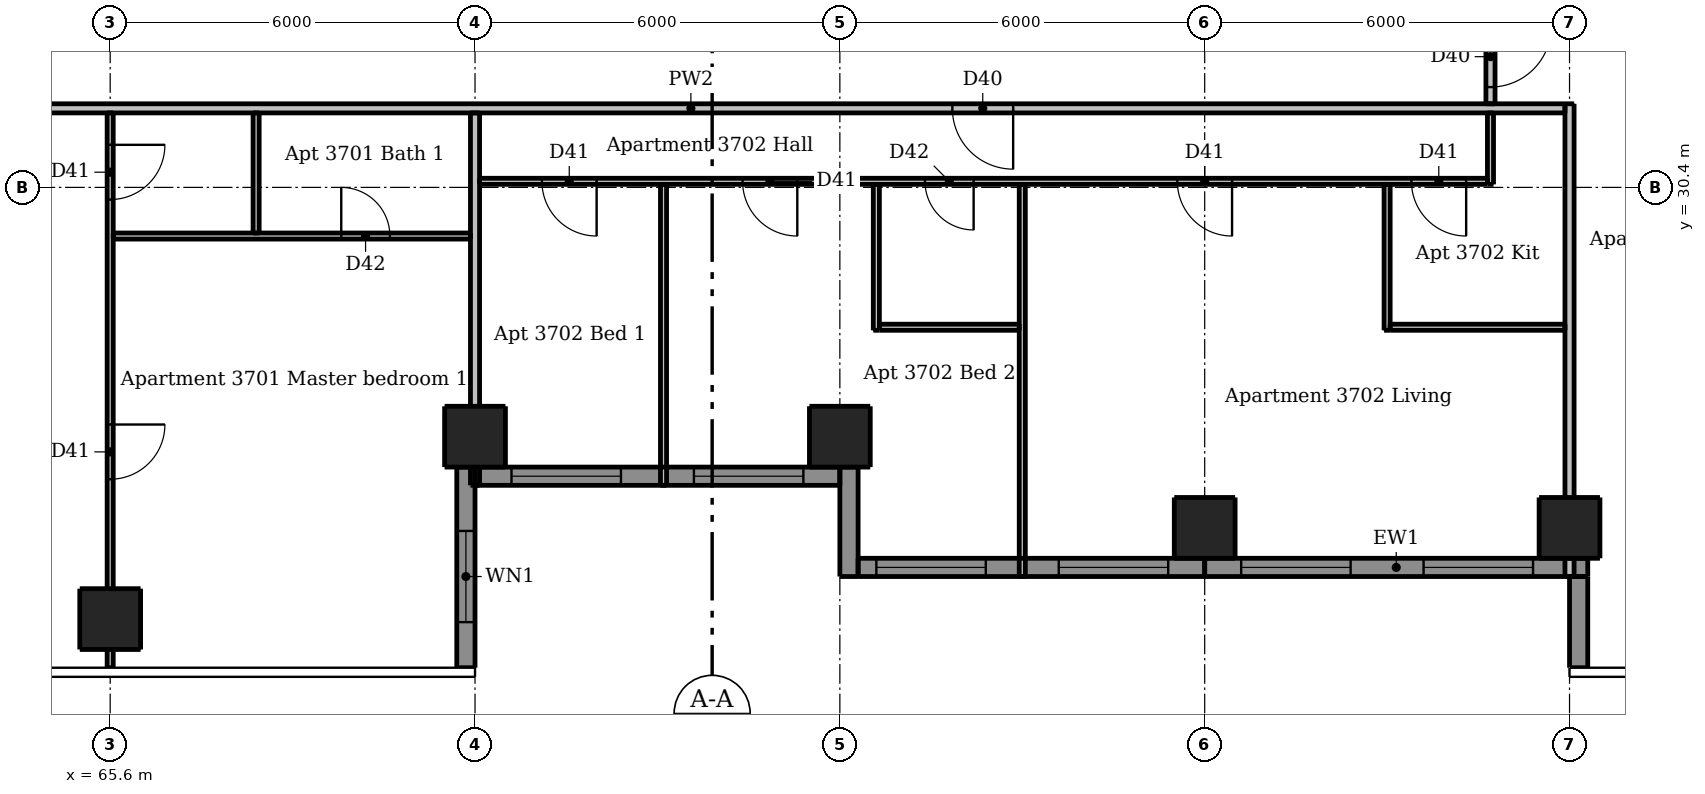
"""IFC4 building model, lengths in metres.
Left out: names, types, materials, properties, quantities, classifications, styles, units other than length and angle.
Written with IfcOpenShell. Run it as: python <this file> out.ifc"""

import sys

from ifc_helpers import new_model, si_unit, direction, frame, frame_2d, origin, origin_2d, place, context, subcontext, project, spatial, rectangle, extrude, element, fill, save


model = new_model("IFC4")
c1 = context("Model", 3, precision=1e-05, world=origin(), true_north=direction((0.0, 1.0)))
c2 = subcontext(c1, "Body", "Model", "MODEL_VIEW")
j1 = project(units=[si_unit("LENGTHUNIT", "METRE"), si_unit("PLANEANGLEUNIT", "RADIAN")], contexts=[c1])
p1 = place(None, origin())
s1 = spatial("IfcSite", under=j1, at=p1, CompositionType="ELEMENT")
p2 = place(p1, origin())
s2 = spatial("IfcBuilding", under=s1, at=p2, CompositionType="ELEMENT")
p3 = place(p2, frame((0.0, 0.0, 140.5)))
s3 = spatial("IfcBuildingStorey", under=s2, at=p3, CompositionType="ELEMENT", Elevation=140.5)
for number, where, z_axis, x_axis in (
    (1, (65.6, 23.3, 0.0), (0.0, 0.0, 1.0), (1.0, 0.0, 0.0)),
    (2, (71.6, 26.3, 0.0), (0.0, 0.0, 1.0), (1.0, 0.0, 0.0)),
    (3, (77.6, 26.3, 0.0), (0.0, 0.0, 1.0), (1.0, 0.0, 0.0)),
    (4, (83.6, 24.8, 0.0), (0.0, 0.0, 1.0), (1.0, 0.0, 0.0)),
    (5, (89.6, 24.8, 0.0), (0.0, 0.0, 1.0), (1.0, 0.0, 0.0)),
):
    element("IfcColumn", number, at=place(p3, frame(where, z_axis=z_axis, x_axis=x_axis)), inside=s3, PredefinedType="COLUMN", context=c2, shape_type="SweptSolid", body=[
        extrude(rectangle(XDim=1.0, YDim=1.0, at=origin_2d()), origin(), (0.0, 0.0, 1.0), 3.05),
    ])
p4 = place(p3, frame((71.45, 22.5, 0.0), z_axis=(0.0, 0.0, 1.0), x_axis=(0.0, 1.0, 0.0)))
e6 = element("IfcWall", 6, at=p4, inside=s3, PredefinedType="SOLIDWALL", context=c2, shape_type="SweptSolid", body=[
    extrude(rectangle(XDim=3.3, YDim=0.3, at=frame_2d((1.65, 0.0))), origin(), (0.0, 0.0, 1.0), 3.05),
])
p5 = place(p4, frame((0.75, 0.0, 0.9)))
e7 = element("IfcOpeningElement", 7, at=p5, cuts=e6, PredefinedType="OPENING", context=c2, shape_type="SweptSolid", body=[
    extrude(rectangle(XDim=1.5, YDim=1.5, at=frame_2d((0.75, 0.75))), frame((0.0, 0.16, 0.0), z_axis=(0.0, -1.0, 0.0), x_axis=(1.0, 0.0, 0.0)), (0.0, 0.0, 1.0), 0.32),
])
p6 = place(p3, frame((77.75, 25.8, 0.0), z_axis=(0.0, 0.0, 1.0), x_axis=(0.0, -1.0, 0.0)))
e8 = element("IfcWall", 8, at=p6, inside=s3, PredefinedType="SOLIDWALL", context=c2, shape_type="SweptSolid", body=[
    extrude(rectangle(XDim=1.8, YDim=0.3, at=frame_2d((0.9, 0.0))), origin(), (0.0, 0.0, 1.0), 3.05),
])
p7 = place(p3, frame((89.75, 24.0, 0.0), z_axis=(0.0, 0.0, 1.0), x_axis=(0.0, -1.0, 0.0)))
e9 = element("IfcWall", 9, at=p7, inside=s3, PredefinedType="SOLIDWALL", context=c2, shape_type="SweptSolid", body=[
    extrude(rectangle(XDim=1.5, YDim=0.3, at=frame_2d((0.75, 0.0))), origin(), (0.0, 0.0, 1.0), 3.05),
])
p8 = place(p3, frame((71.6, 25.65, 0.0), z_axis=(0.0, 0.0, 1.0), x_axis=(1.0, 0.0, 0.0)))
e10 = element("IfcWall", 10, at=p8, inside=s3, PredefinedType="SOLIDWALL", context=c2, shape_type="SweptSolid", body=[
    extrude(rectangle(XDim=6.0, YDim=0.3, at=frame_2d((3.0, 0.0))), origin(), (0.0, 0.0, 1.0), 3.05),
])
p9 = place(p8, frame((0.6, 0.0, 0.15)))
e11 = element("IfcOpeningElement", 11, at=p9, cuts=e10, PredefinedType="OPENING", context=c2, shape_type="SweptSolid", body=[
    extrude(rectangle(XDim=1.8, YDim=2.1, at=frame_2d((0.9, 1.05))), frame((0.0, 0.16, 0.0), z_axis=(0.0, -1.0, 0.0), x_axis=(1.0, 0.0, 0.0)), (0.0, 0.0, 1.0), 0.32),
])
p10 = place(p8, frame((3.6, 0.0, 0.15)))
e12 = element("IfcOpeningElement", 12, at=p10, cuts=e10, PredefinedType="OPENING", context=c2, shape_type="SweptSolid", body=[
    extrude(rectangle(XDim=1.8, YDim=2.1, at=frame_2d((0.9, 1.05))), frame((0.0, 0.16, 0.0), z_axis=(0.0, -1.0, 0.0), x_axis=(1.0, 0.0, 0.0)), (0.0, 0.0, 1.0), 0.32),
])
p11 = place(p3, frame((77.9, 24.15, 0.0), z_axis=(0.0, 0.0, 1.0), x_axis=(1.0, 0.0, 0.0)))
e13 = element("IfcWall", 13, at=p11, inside=s3, PredefinedType="SOLIDWALL", context=c2, shape_type="SweptSolid", body=[
    extrude(rectangle(XDim=5.7, YDim=0.3, at=frame_2d((2.85, 0.0))), origin(), (0.0, 0.0, 1.0), 3.05),
])
p12 = place(p11, frame((0.3, 0.0, 0.15)))
e14 = element("IfcOpeningElement", 14, at=p12, cuts=e13, PredefinedType="OPENING", context=c2, shape_type="SweptSolid", body=[
    extrude(rectangle(XDim=1.8, YDim=2.1, at=frame_2d((0.9, 1.05))), frame((0.0, 0.16, 0.0), z_axis=(0.0, -1.0, 0.0), x_axis=(1.0, 0.0, 0.0)), (0.0, 0.0, 1.0), 0.32),
])
p13 = place(p11, frame((3.3, 0.0, 0.15)))
e15 = element("IfcOpeningElement", 15, at=p13, cuts=e13, PredefinedType="OPENING", context=c2, shape_type="SweptSolid", body=[
    extrude(rectangle(XDim=1.8, YDim=2.1, at=frame_2d((0.9, 1.05))), frame((0.0, 0.16, 0.0), z_axis=(0.0, -1.0, 0.0), x_axis=(1.0, 0.0, 0.0)), (0.0, 0.0, 1.0), 0.32),
])
p14 = place(p3, frame((83.6, 24.15, 0.0), z_axis=(0.0, 0.0, 1.0), x_axis=(1.0, 0.0, 0.0)))
e16 = element("IfcWall", 16, at=p14, inside=s3, PredefinedType="SOLIDWALL", context=c2, shape_type="SweptSolid", body=[
    extrude(rectangle(XDim=6.3, YDim=0.3, at=frame_2d((3.15, 0.0))), origin(), (0.0, 0.0, 1.0), 3.05),
])
p15 = place(p14, frame((0.6, 0.0, 0.15)))
e17 = element("IfcOpeningElement", 17, at=p15, cuts=e16, PredefinedType="OPENING", context=c2, shape_type="SweptSolid", body=[
    extrude(rectangle(XDim=1.8, YDim=2.1, at=frame_2d((0.9, 1.05))), frame((0.0, 0.16, 0.0), z_axis=(0.0, -1.0, 0.0), x_axis=(1.0, 0.0, 0.0)), (0.0, 0.0, 1.0), 0.32),
])
p16 = place(p14, frame((3.6, 0.0, 0.15)))
e18 = element("IfcOpeningElement", 18, at=p16, cuts=e16, PredefinedType="OPENING", context=c2, shape_type="SweptSolid", body=[
    extrude(rectangle(XDim=1.8, YDim=2.1, at=frame_2d((0.9, 1.05))), frame((0.0, 0.16, 0.0), z_axis=(0.0, -1.0, 0.0), x_axis=(1.0, 0.0, 0.0)), (0.0, 0.0, 1.0), 0.32),
])
p17 = place(p3, frame((65.6, 31.625, 0.0), z_axis=(0.0, 0.0, 1.0), x_axis=(0.0, -1.0, 0.0)))
e19 = element("IfcWall", 19, at=p17, inside=s3, PredefinedType="PARTITIONING", context=c2, shape_type="SweptSolid", body=[
    extrude(rectangle(XDim=9.125, YDim=0.1, at=frame_2d((4.562, 0.0))), origin(), (0.0, 0.0, 1.0), 2.516),
])
p18 = place(p17, frame((0.525, 0.0, 0.0)))
e20 = element("IfcOpeningElement", 20, at=p18, cuts=e19, PredefinedType="OPENING", context=c2, shape_type="SweptSolid", body=[
    extrude(rectangle(XDim=0.9, YDim=2.1, at=frame_2d((0.45, 1.05))), frame((0.0, 0.06, 0.0), z_axis=(0.0, -1.0, 0.0), x_axis=(1.0, 0.0, 0.0)), (0.0, 0.0, 1.0), 0.12),
])
p19 = place(p17, frame((5.125, 0.0, 0.0)))
e21 = element("IfcOpeningElement", 21, at=p19, cuts=e19, PredefinedType="OPENING", context=c2, shape_type="SweptSolid", body=[
    extrude(rectangle(XDim=0.9, YDim=2.1, at=frame_2d((0.45, 1.05))), frame((0.0, 0.06, 0.0), z_axis=(0.0, -1.0, 0.0), x_axis=(1.0, 0.0, 0.0)), (0.0, 0.0, 1.0), 0.12),
])
p20 = place(p3, frame((68.0, 29.65, 0.0), z_axis=(0.0, 0.0, 1.0), x_axis=(0.0, 1.0, 0.0)))
e22 = element("IfcWall", 22, at=p20, inside=s3, PredefinedType="PARTITIONING", context=c2, shape_type="SweptSolid", body=[
    extrude(rectangle(XDim=1.975, YDim=0.1, at=frame_2d((0.988, 0.0))), origin(), (0.0, 0.0, 1.0), 3.05),
])
p21 = place(p3, frame((74.7, 25.5, 0.0), z_axis=(0.0, 0.0, 1.0), x_axis=(0.0, 1.0, 0.0)))
e23 = element("IfcWall", 23, at=p21, inside=s3, PredefinedType="PARTITIONING", context=c2, shape_type="SweptSolid", body=[
    extrude(rectangle(XDim=4.95, YDim=0.1, at=frame_2d((2.475, 0.0))), origin(), (0.0, 0.0, 1.0), 3.05),
])
p22 = place(p3, frame((78.2, 28.05, 0.0), z_axis=(0.0, 0.0, 1.0), x_axis=(0.0, 1.0, 0.0)))
e24 = element("IfcWall", 24, at=p22, inside=s3, PredefinedType="PARTITIONING", context=c2, shape_type="SweptSolid", body=[
    extrude(rectangle(XDim=2.4, YDim=0.1, at=frame_2d((1.2, 0.0))), origin(), (0.0, 0.0, 1.0), 3.05),
])
p23 = place(p3, frame((80.6, 24.0, 0.0), z_axis=(0.0, 0.0, 1.0), x_axis=(0.0, 1.0, 0.0)))
e25 = element("IfcWall", 25, at=p23, inside=s3, PredefinedType="PARTITIONING", context=c2, shape_type="SweptSolid", body=[
    extrude(rectangle(XDim=6.45, YDim=0.1, at=frame_2d((3.225, 0.0))), origin(), (0.0, 0.0, 1.0), 3.05),
])
p24 = place(p3, frame((86.6, 28.05, 0.0), z_axis=(0.0, 0.0, 1.0), x_axis=(0.0, 1.0, 0.0)))
e26 = element("IfcWall", 26, at=p24, inside=s3, PredefinedType="PARTITIONING", context=c2, shape_type="SweptSolid", body=[
    extrude(rectangle(XDim=2.4, YDim=0.1, at=frame_2d((1.2, 0.0))), origin(), (0.0, 0.0, 1.0), 3.05),
])
p25 = place(p3, frame((88.3, 30.45, 0.0), z_axis=(0.0, 0.0, 1.0), x_axis=(0.0, 1.0, 0.0)))
e27 = element("IfcWall", 27, at=p25, inside=s3, PredefinedType="PARTITIONING", context=c2, shape_type="SweptSolid", body=[
    extrude(rectangle(XDim=1.175, YDim=0.1, at=frame_2d((0.587, 0.0))), origin(), (0.0, 0.0, 1.0), 3.05),
])
p26 = place(p3, frame((88.25, 30.5, 0.0), z_axis=(0.0, 0.0, 1.0), x_axis=(-1.0, 0.0, 0.0)))
e28 = element("IfcWall", 28, at=p26, inside=s3, PredefinedType="PARTITIONING", context=c2, shape_type="SweptSolid", body=[
    extrude(rectangle(XDim=16.575, YDim=0.1, at=frame_2d((8.288, 0.0))), origin(), (0.0, 0.0, 1.0), 3.05),
])
p27 = place(p26, frame((4.2, 0.0, 0.0)))
e29 = element("IfcOpeningElement", 29, at=p27, cuts=e28, PredefinedType="OPENING", context=c2, shape_type="SweptSolid", body=[
    extrude(rectangle(XDim=0.9, YDim=2.1, at=frame_2d((0.45, 1.05))), frame((0.0, 0.06, 0.0), z_axis=(0.0, -1.0, 0.0), x_axis=(1.0, 0.0, 0.0)), (0.0, 0.0, 1.0), 0.12),
])
p28 = place(p26, frame((0.35, 0.0, 0.0)))
e30 = element("IfcOpeningElement", 30, at=p28, cuts=e28, PredefinedType="OPENING", context=c2, shape_type="SweptSolid", body=[
    extrude(rectangle(XDim=0.9, YDim=2.1, at=frame_2d((0.45, 1.05))), frame((0.0, 0.06, 0.0), z_axis=(0.0, -1.0, 0.0), x_axis=(1.0, 0.0, 0.0)), (0.0, 0.0, 1.0), 0.12),
])
p29 = place(p26, frame((14.65, 0.0, 0.0)))
e31 = element("IfcOpeningElement", 31, at=p29, cuts=e28, PredefinedType="OPENING", context=c2, shape_type="SweptSolid", body=[
    extrude(rectangle(XDim=0.9, YDim=2.1, at=frame_2d((0.45, 1.05))), frame((0.0, 0.06, 0.0), z_axis=(0.0, -1.0, 0.0), x_axis=(1.0, 0.0, 0.0)), (0.0, 0.0, 1.0), 0.12),
])
p30 = place(p26, frame((11.35, 0.0, 0.0)))
e32 = element("IfcOpeningElement", 32, at=p30, cuts=e28, PredefinedType="OPENING", context=c2, shape_type="SweptSolid", body=[
    extrude(rectangle(XDim=0.9, YDim=2.1, at=frame_2d((0.45, 1.05))), frame((0.0, 0.06, 0.0), z_axis=(0.0, -1.0, 0.0), x_axis=(1.0, 0.0, 0.0)), (0.0, 0.0, 1.0), 0.12),
])
p31 = place(p26, frame((8.45, 0.0, 0.0)))
e33 = element("IfcOpeningElement", 33, at=p31, cuts=e28, PredefinedType="OPENING", context=c2, shape_type="SweptSolid", body=[
    extrude(rectangle(XDim=0.8, YDim=2.1, at=frame_2d((0.4, 1.05))), frame((0.0, 0.06, 0.0), z_axis=(0.0, -1.0, 0.0), x_axis=(1.0, 0.0, 0.0)), (0.0, 0.0, 1.0), 0.12),
])
p32 = place(p3, frame((65.65, 29.6, 0.0), z_axis=(0.0, 0.0, 1.0), x_axis=(1.0, 0.0, 0.0)))
e34 = element("IfcWall", 34, at=p32, inside=s3, PredefinedType="PARTITIONING", context=c2, shape_type="SweptSolid", body=[
    extrude(rectangle(XDim=5.875, YDim=0.1, at=frame_2d((2.938, 0.0))), origin(), (0.0, 0.0, 1.0), 3.05),
])
p33 = place(p32, frame((3.75, 0.0, 0.0)))
e35 = element("IfcOpeningElement", 35, at=p33, cuts=e34, PredefinedType="OPENING", context=c2, shape_type="SweptSolid", body=[
    extrude(rectangle(XDim=0.8, YDim=2.1, at=frame_2d((0.4, 1.05))), frame((0.0, 0.06, 0.0), z_axis=(0.0, -1.0, 0.0), x_axis=(1.0, 0.0, 0.0)), (0.0, 0.0, 1.0), 0.12),
])
p34 = place(p3, frame((78.25, 28.1, 0.0), z_axis=(0.0, 0.0, 1.0), x_axis=(1.0, 0.0, 0.0)))
e36 = element("IfcWall", 36, at=p34, inside=s3, PredefinedType="PARTITIONING", context=c2, shape_type="SweptSolid", body=[
    extrude(rectangle(XDim=2.3, YDim=0.1, at=frame_2d((1.15, 0.0))), origin(), (0.0, 0.0, 1.0), 3.05),
])
p35 = place(p3, frame((86.65, 28.1, 0.0), z_axis=(0.0, 0.0, 1.0), x_axis=(1.0, 0.0, 0.0)))
e37 = element("IfcWall", 37, at=p35, inside=s3, PredefinedType="PARTITIONING", context=c2, shape_type="SweptSolid", body=[
    extrude(rectangle(XDim=2.875, YDim=0.1, at=frame_2d((1.438, 0.0))), origin(), (0.0, 0.0, 1.0), 3.05),
])
p36 = place(p3, frame((71.6, 25.5, 0.0), z_axis=(0.0, 0.0, 1.0), x_axis=(0.0, 1.0, 0.0)))
e38 = element("IfcWall", 38, at=p36, inside=s3, PredefinedType="PARTITIONING", context=c2, shape_type="SweptSolid", body=[
    extrude(rectangle(XDim=6.125, YDim=0.15, at=frame_2d((3.062, 0.0))), origin(), (0.0, 0.0, 1.0), 2.59),
])
p37 = place(p3, frame((88.3, 60.475, 0.0), z_axis=(0.0, 0.0, 1.0), x_axis=(0.0, -1.0, 0.0)))
e39 = element("IfcWall", 39, at=p37, inside=s3, PredefinedType="PARTITIONING", context=c2, shape_type="SweptSolid", body=[
    extrude(rectangle(XDim=28.7, YDim=0.15, at=frame_2d((14.35, 0.0))), origin(), (0.0, 0.0, 1.0), 3.05),
])
p38 = place(p37, frame((27.425, 0.0, 0.0)))
e40 = element("IfcOpeningElement", 40, at=p38, cuts=e39, PredefinedType="OPENING", context=c2, shape_type="SweptSolid", body=[
    extrude(rectangle(XDim=1.0, YDim=2.1, at=frame_2d((0.5, 1.05))), frame((0.0, 0.085, 0.0), z_axis=(0.0, -1.0, 0.0), x_axis=(1.0, 0.0, 0.0)), (0.0, 0.0, 1.0), 0.17),
])
p39 = place(p37, frame((10.575, 0.0, 0.0)))
e41 = element("IfcOpeningElement", 41, at=p39, cuts=e39, PredefinedType="OPENING", context=c2, shape_type="SweptSolid", body=[
    extrude(rectangle(XDim=1.0, YDim=2.1, at=frame_2d((0.5, 1.05))), frame((0.0, 0.085, 0.0), z_axis=(0.0, -1.0, 0.0), x_axis=(1.0, 0.0, 0.0)), (0.0, 0.0, 1.0), 0.17),
])
p40 = place(p3, frame((89.6, 24.0, 0.0), z_axis=(0.0, 0.0, 1.0), x_axis=(0.0, 1.0, 0.0)))
e42 = element("IfcWall", 42, at=p40, inside=s3, PredefinedType="PARTITIONING", context=c2, shape_type="SweptSolid", body=[
    extrude(rectangle(XDim=7.775, YDim=0.15, at=frame_2d((3.887, 0.0))), origin(), (0.0, 0.0, 1.0), 2.51),
])
p41 = place(p3, frame((89.525, 31.7, 0.0), z_axis=(0.0, 0.0, 1.0), x_axis=(-1.0, 0.0, 0.0)))
e43 = element("IfcWall", 43, at=p41, inside=s3, PredefinedType="PARTITIONING", context=c2, shape_type="SweptSolid", body=[
    extrude(rectangle(XDim=28.75, YDim=0.15, at=frame_2d((14.375, 0.0))), origin(), (0.0, 0.0, 1.0), 3.05),
])
p42 = place(p41, frame((25.875, 0.0, 0.0)))
e44 = element("IfcOpeningElement", 44, at=p42, cuts=e43, PredefinedType="OPENING", context=c2, shape_type="SweptSolid", body=[
    extrude(rectangle(XDim=1.0, YDim=2.1, at=frame_2d((0.5, 1.05))), frame((0.0, 0.085, 0.0), z_axis=(0.0, -1.0, 0.0), x_axis=(1.0, 0.0, 0.0)), (0.0, 0.0, 1.0), 0.17),
])
p43 = place(p41, frame((9.075, 0.0, 0.0)))
e45 = element("IfcOpeningElement", 45, at=p43, cuts=e43, PredefinedType="OPENING", context=c2, shape_type="SweptSolid", body=[
    extrude(rectangle(XDim=1.0, YDim=2.1, at=frame_2d((0.5, 1.05))), frame((0.0, 0.085, 0.0), z_axis=(0.0, -1.0, 0.0), x_axis=(1.0, 0.0, 0.0)), (0.0, 0.0, 1.0), 0.17),
])
p44 = place(p5, origin())
e46 = element("IfcWindow", 46, at=p44, inside=s3, PartitioningType="DOUBLE_PANEL_VERTICAL", PredefinedType="WINDOW", context=c2, shape_type="SweptSolid", body=[
    extrude(rectangle(XDim=1.5, YDim=1.5, at=frame_2d((0.75, 0.75))), frame((0.0, 0.03, 0.0), z_axis=(0.0, -1.0, 0.0), x_axis=(1.0, 0.0, 0.0)), (0.0, 0.0, 1.0), 0.06),
])
fill(e7, e46)
p45 = place(p9, origin())
e47 = element("IfcWindow", 47, at=p45, inside=s3, PartitioningType="DOUBLE_PANEL_VERTICAL", PredefinedType="WINDOW", context=c2, shape_type="SweptSolid", body=[
    extrude(rectangle(XDim=1.8, YDim=2.1, at=frame_2d((0.9, 1.05))), frame((0.0, 0.03, 0.0), z_axis=(0.0, -1.0, 0.0), x_axis=(1.0, 0.0, 0.0)), (0.0, 0.0, 1.0), 0.06),
])
fill(e11, e47)
p46 = place(p10, origin())
e48 = element("IfcWindow", 48, at=p46, inside=s3, PartitioningType="DOUBLE_PANEL_VERTICAL", PredefinedType="WINDOW", context=c2, shape_type="SweptSolid", body=[
    extrude(rectangle(XDim=1.8, YDim=2.1, at=frame_2d((0.9, 1.05))), frame((0.0, 0.03, 0.0), z_axis=(0.0, -1.0, 0.0), x_axis=(1.0, 0.0, 0.0)), (0.0, 0.0, 1.0), 0.06),
])
fill(e12, e48)
p47 = place(p12, origin())
e49 = element("IfcWindow", 49, at=p47, inside=s3, PartitioningType="DOUBLE_PANEL_VERTICAL", PredefinedType="WINDOW", context=c2, shape_type="SweptSolid", body=[
    extrude(rectangle(XDim=1.8, YDim=2.1, at=frame_2d((0.9, 1.05))), frame((0.0, 0.03, 0.0), z_axis=(0.0, -1.0, 0.0), x_axis=(1.0, 0.0, 0.0)), (0.0, 0.0, 1.0), 0.06),
])
fill(e14, e49)
p48 = place(p13, origin())
e50 = element("IfcWindow", 50, at=p48, inside=s3, PartitioningType="DOUBLE_PANEL_VERTICAL", PredefinedType="WINDOW", context=c2, shape_type="SweptSolid", body=[
    extrude(rectangle(XDim=1.8, YDim=2.1, at=frame_2d((0.9, 1.05))), frame((0.0, 0.03, 0.0), z_axis=(0.0, -1.0, 0.0), x_axis=(1.0, 0.0, 0.0)), (0.0, 0.0, 1.0), 0.06),
])
fill(e15, e50)
p49 = place(p15, origin())
e51 = element("IfcWindow", 51, at=p49, inside=s3, PartitioningType="DOUBLE_PANEL_VERTICAL", PredefinedType="WINDOW", context=c2, shape_type="SweptSolid", body=[
    extrude(rectangle(XDim=1.8, YDim=2.1, at=frame_2d((0.9, 1.05))), frame((0.0, 0.03, 0.0), z_axis=(0.0, -1.0, 0.0), x_axis=(1.0, 0.0, 0.0)), (0.0, 0.0, 1.0), 0.06),
])
fill(e17, e51)
p50 = place(p16, origin())
e52 = element("IfcWindow", 52, at=p50, inside=s3, PartitioningType="DOUBLE_PANEL_VERTICAL", PredefinedType="WINDOW", context=c2, shape_type="SweptSolid", body=[
    extrude(rectangle(XDim=1.8, YDim=2.1, at=frame_2d((0.9, 1.05))), frame((0.0, 0.03, 0.0), z_axis=(0.0, -1.0, 0.0), x_axis=(1.0, 0.0, 0.0)), (0.0, 0.0, 1.0), 0.06),
])
fill(e18, e52)
p51 = place(p18, origin())
e53 = element("IfcDoor", 53, at=p51, inside=s3, OperationType="SINGLE_SWING_LEFT", PredefinedType="DOOR", context=c2, shape_type="SweptSolid", body=[
    extrude(rectangle(XDim=0.9, YDim=2.1, at=frame_2d((0.45, 1.05))), frame((0.0, 0.025, 0.0), z_axis=(0.0, -1.0, 0.0), x_axis=(1.0, 0.0, 0.0)), (0.0, 0.0, 1.0), 0.05),
])
fill(e20, e53)
p52 = place(p19, origin())
e54 = element("IfcDoor", 54, at=p52, inside=s3, OperationType="SINGLE_SWING_LEFT", PredefinedType="DOOR", context=c2, shape_type="SweptSolid", body=[
    extrude(rectangle(XDim=0.9, YDim=2.1, at=frame_2d((0.45, 1.05))), frame((0.0, 0.025, 0.0), z_axis=(0.0, -1.0, 0.0), x_axis=(1.0, 0.0, 0.0)), (0.0, 0.0, 1.0), 0.05),
])
fill(e21, e54)
p53 = place(p33, origin())
e55 = element("IfcDoor", 55, at=p53, inside=s3, OperationType="SINGLE_SWING_LEFT", PredefinedType="DOOR", context=c2, shape_type="SweptSolid", body=[
    extrude(rectangle(XDim=0.8, YDim=2.1, at=frame_2d((0.4, 1.05))), frame((0.0, 0.025, 0.0), z_axis=(0.0, -1.0, 0.0), x_axis=(1.0, 0.0, 0.0)), (0.0, 0.0, 1.0), 0.05),
])
fill(e35, e55)
p54 = place(p43, origin())
e56 = element("IfcDoor", 56, at=p54, inside=s3, OperationType="SINGLE_SWING_LEFT", PredefinedType="DOOR", context=c2, shape_type="SweptSolid", body=[
    extrude(rectangle(XDim=1.0, YDim=2.1, at=frame_2d((0.5, 1.05))), frame((0.0, 0.025, 0.0), z_axis=(0.0, -1.0, 0.0), x_axis=(1.0, 0.0, 0.0)), (0.0, 0.0, 1.0), 0.05),
])
fill(e45, e56)
p55 = place(p27, origin())
e57 = element("IfcDoor", 57, at=p55, inside=s3, OperationType="SINGLE_SWING_LEFT", PredefinedType="DOOR", context=c2, shape_type="SweptSolid", body=[
    extrude(rectangle(XDim=0.9, YDim=2.1, at=frame_2d((0.45, 1.05))), frame((0.0, 0.025, 0.0), z_axis=(0.0, -1.0, 0.0), x_axis=(1.0, 0.0, 0.0)), (0.0, 0.0, 1.0), 0.05),
])
fill(e29, e57)
p56 = place(p28, origin())
e58 = element("IfcDoor", 58, at=p56, inside=s3, OperationType="SINGLE_SWING_LEFT", PredefinedType="DOOR", context=c2, shape_type="SweptSolid", body=[
    extrude(rectangle(XDim=0.9, YDim=2.1, at=frame_2d((0.45, 1.05))), frame((0.0, 0.025, 0.0), z_axis=(0.0, -1.0, 0.0), x_axis=(1.0, 0.0, 0.0)), (0.0, 0.0, 1.0), 0.05),
])
fill(e30, e58)
p57 = place(p29, origin())
e59 = element("IfcDoor", 59, at=p57, inside=s3, OperationType="SINGLE_SWING_LEFT", PredefinedType="DOOR", context=c2, shape_type="SweptSolid", body=[
    extrude(rectangle(XDim=0.9, YDim=2.1, at=frame_2d((0.45, 1.05))), frame((0.0, 0.025, 0.0), z_axis=(0.0, -1.0, 0.0), x_axis=(1.0, 0.0, 0.0)), (0.0, 0.0, 1.0), 0.05),
])
fill(e31, e59)
p58 = place(p30, origin())
e60 = element("IfcDoor", 60, at=p58, inside=s3, OperationType="SINGLE_SWING_LEFT", PredefinedType="DOOR", context=c2, shape_type="SweptSolid", body=[
    extrude(rectangle(XDim=0.9, YDim=2.1, at=frame_2d((0.45, 1.05))), frame((0.0, 0.025, 0.0), z_axis=(0.0, -1.0, 0.0), x_axis=(1.0, 0.0, 0.0)), (0.0, 0.0, 1.0), 0.05),
])
fill(e32, e60)
p59 = place(p31, origin())
e61 = element("IfcDoor", 61, at=p59, inside=s3, OperationType="SINGLE_SWING_LEFT", PredefinedType="DOOR", context=c2, shape_type="SweptSolid", body=[
    extrude(rectangle(XDim=0.8, YDim=2.1, at=frame_2d((0.4, 1.05))), frame((0.0, 0.025, 0.0), z_axis=(0.0, -1.0, 0.0), x_axis=(1.0, 0.0, 0.0)), (0.0, 0.0, 1.0), 0.05),
])
fill(e33, e61)
p60 = place(p38, origin())
e62 = element("IfcDoor", 62, at=p60, inside=s3, OperationType="SINGLE_SWING_LEFT", PredefinedType="DOOR", context=c2, shape_type="SweptSolid", body=[
    extrude(rectangle(XDim=1.0, YDim=2.1, at=frame_2d((0.5, 1.05))), frame((0.0, 0.025, 0.0), z_axis=(0.0, -1.0, 0.0), x_axis=(1.0, 0.0, 0.0)), (0.0, 0.0, 1.0), 0.05),
])
fill(e40, e62)
save(model, sys.argv[1])
